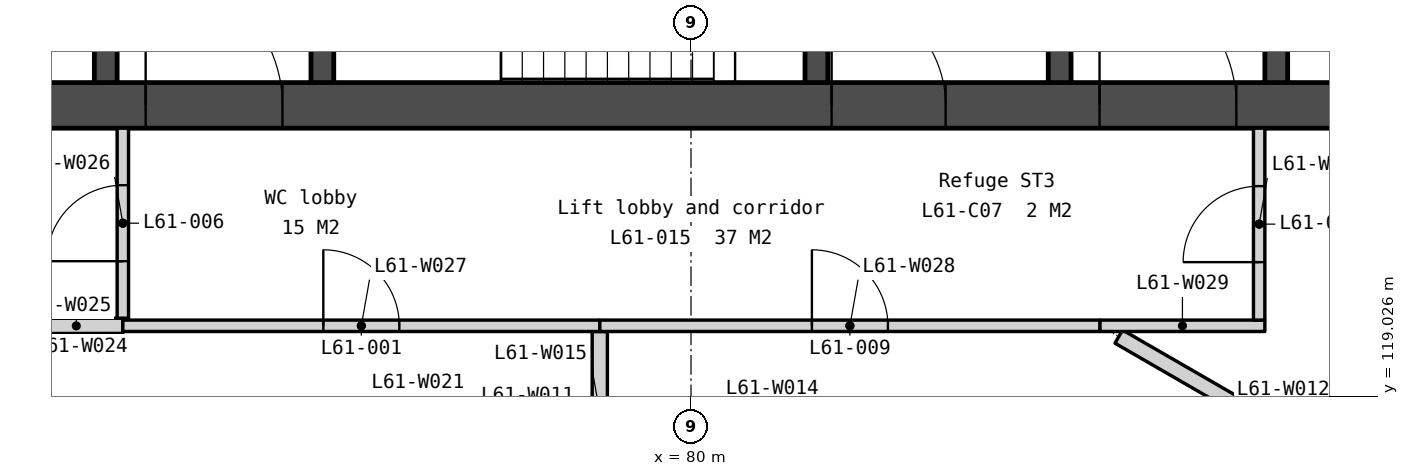
"""IFC4 building model, lengths in metres.
Left out: names, types, materials, properties, quantities, classifications, styles, units other than length and angle.
Written with IfcOpenShell. Run it as: python <this file> out.ifc"""

import sys

from ifc_helpers import new_model, si_unit, direction, frame, frame_2d, origin, place, context, subcontext, project, spatial, polyline, rectangle, outline, extrude, element, fill, save


model = new_model("IFC4")
c1 = context("Model", 3, precision=1e-05, world=origin(), true_north=direction((0.0, 1.0)))
c2 = subcontext(c1, "Body", "Model", "MODEL_VIEW")
j1 = project(units=[si_unit("LENGTHUNIT", "METRE"), si_unit("PLANEANGLEUNIT", "RADIAN")], contexts=[c1])
p1 = place(None, origin())
s1 = spatial("IfcSite", under=j1, at=p1, CompositionType="ELEMENT")
p2 = place(p1, origin())
s2 = spatial("IfcBuilding", under=s1, at=p2, CompositionType="ELEMENT")
p3 = place(p2, frame((0.0, 0.0, 250.4)))
s3 = spatial("IfcBuildingStorey", under=s2, at=p3, CompositionType="ELEMENT", Elevation=250.4)
p4 = place(p3, frame((69.0, 122.85, 0.0), z_axis=(0.0, 0.0, 1.0), x_axis=(1.0, 0.0, 0.0)))
e1 = element("IfcWall", 1, at=p4, inside=s3, PredefinedType="SOLIDWALL", context=c2, shape_type="SweptSolid", body=[
    extrude(rectangle(XDim=22.0, YDim=0.6, at=frame_2d((11.0, 0.0))), origin(), (0.0, 0.0, 1.0), 3.75),
])
p5 = place(p4, frame((16.375, 0.0, 0.0)))
e2 = element("IfcOpeningElement", 2, at=p5, cuts=e1, PredefinedType="OPENING", context=c2, shape_type="SweptSolid", body=[
    extrude(rectangle(XDim=1.8, YDim=2.1, at=frame_2d((0.9, 1.05))), frame((0.0, 0.31, 0.0), z_axis=(0.0, -1.0, 0.0), x_axis=(1.0, 0.0, 0.0)), (0.0, 0.0, 1.0), 0.62),
])
p6 = place(p4, frame((3.825, 0.0, 0.0)))
e3 = element("IfcOpeningElement", 3, at=p6, cuts=e1, PredefinedType="OPENING", context=c2, shape_type="SweptSolid", body=[
    extrude(rectangle(XDim=1.8, YDim=2.1, at=frame_2d((0.9, 1.05))), frame((0.0, 0.31, 0.0), z_axis=(0.0, -1.0, 0.0), x_axis=(1.0, 0.0, 0.0)), (0.0, 0.0, 1.0), 0.62),
])
p7 = place(p4, frame((12.85, 0.0, 0.0)))
e4 = element("IfcOpeningElement", 4, at=p7, cuts=e1, PredefinedType="OPENING", context=c2, shape_type="SweptSolid", body=[
    extrude(rectangle(XDim=1.5, YDim=2.1, at=frame_2d((0.75, 1.05))), frame((0.0, 0.31, 0.0), z_axis=(0.0, -1.0, 0.0), x_axis=(1.0, 0.0, 0.0)), (0.0, 0.0, 1.0), 0.62),
])
p8 = place(p3, frame((72.3, 133.95, 0.0), z_axis=(0.0, 0.0, 1.0), x_axis=(0.0, -1.0, 0.0)))
e5 = element("IfcWall", 5, at=p8, inside=s3, PredefinedType="SOLIDWALL", context=c2, shape_type="SweptSolid", body=[
    extrude(rectangle(XDim=10.8, YDim=0.3, at=frame_2d((5.4, 0.0))), origin(), (0.0, 0.0, 1.0), 3.75),
])
p9 = place(p8, frame((6.95, 0.0, 0.0)))
e6 = element("IfcOpeningElement", 6, at=p9, cuts=e5, PredefinedType="OPENING", context=c2, shape_type="SweptSolid", body=[
    extrude(rectangle(XDim=1.1, YDim=2.1, at=frame_2d((0.55, 1.05))), frame((0.0, 0.16, 0.0), z_axis=(0.0, -1.0, 0.0), x_axis=(1.0, 0.0, 0.0)), (0.0, 0.0, 1.0), 0.32),
])
p10 = place(p8, frame((9.35, 0.0, 0.0)))
e7 = element("IfcOpeningElement", 7, at=p10, cuts=e5, PredefinedType="OPENING", context=c2, shape_type="SweptSolid", body=[
    extrude(rectangle(XDim=0.9, YDim=2.1, at=frame_2d((0.45, 1.05))), frame((0.0, 0.16, 0.0), z_axis=(0.0, -1.0, 0.0), x_axis=(1.0, 0.0, 0.0)), (0.0, 0.0, 1.0), 0.32),
])
p11 = place(p8, frame((5.1, 0.0, 0.0)))
e8 = element("IfcOpeningElement", 8, at=p11, cuts=e5, PredefinedType="OPENING", context=c2, shape_type="SweptSolid", body=[
    extrude(rectangle(XDim=1.0, YDim=2.1, at=frame_2d((0.5, 1.05))), frame((0.0, 0.16, 0.0), z_axis=(0.0, -1.0, 0.0), x_axis=(1.0, 0.0, 0.0)), (0.0, 0.0, 1.0), 0.32),
])
p12 = place(p3, frame((75.15, 125.7, 0.0), z_axis=(0.0, 0.0, 1.0), x_axis=(0.0, -1.0, 0.0)))
e9 = element("IfcWall", 9, at=p12, inside=s3, PredefinedType="SOLIDWALL", context=c2, shape_type="SweptSolid", body=[
    extrude(rectangle(XDim=2.55, YDim=0.3, at=frame_2d((1.275, 0.0))), origin(), (0.0, 0.0, 1.0), 3.75),
])
p13 = place(p3, frame((81.65, 125.7, 0.0), z_axis=(0.0, 0.0, 1.0), x_axis=(0.0, -1.0, 0.0)))
e10 = element("IfcWall", 10, at=p13, inside=s3, PredefinedType="SOLIDWALL", context=c2, shape_type="SweptSolid", body=[
    extrude(rectangle(XDim=2.55, YDim=0.3, at=frame_2d((1.275, 0.0))), origin(), (0.0, 0.0, 1.0), 3.75),
])
p14 = place(p13, frame((0.75, 0.0, 0.0)))
e11 = element("IfcOpeningElement", 11, at=p14, cuts=e10, PredefinedType="OPENING", context=c2, shape_type="SweptSolid", body=[
    extrude(rectangle(XDim=1.0, YDim=2.1, at=frame_2d((0.5, 1.05))), frame((0.0, 0.16, 0.0), z_axis=(0.0, -1.0, 0.0), x_axis=(1.0, 0.0, 0.0)), (0.0, 0.0, 1.0), 0.32),
])
p15 = place(p3, frame((84.85, 125.85, 0.0), z_axis=(0.0, 0.0, 1.0), x_axis=(0.0, -1.0, 0.0)))
e12 = element("IfcWall", 12, at=p15, inside=s3, PredefinedType="SOLIDWALL", context=c2, shape_type="SweptSolid", body=[
    extrude(rectangle(XDim=2.7, YDim=0.3, at=frame_2d((1.35, 0.0))), origin(), (0.0, 0.0, 1.0), 3.75),
])
p16 = place(p3, frame((87.7, 133.95, 0.0), z_axis=(0.0, 0.0, 1.0), x_axis=(0.0, -1.0, 0.0)))
e13 = element("IfcWall", 13, at=p16, inside=s3, PredefinedType="SOLIDWALL", context=c2, shape_type="SweptSolid", body=[
    extrude(rectangle(XDim=10.8, YDim=0.3, at=frame_2d((5.4, 0.0))), origin(), (0.0, 0.0, 1.0), 3.75),
])
p17 = place(p16, frame((6.95, 0.0, 0.0)))
e14 = element("IfcOpeningElement", 14, at=p17, cuts=e13, PredefinedType="OPENING", context=c2, shape_type="SweptSolid", body=[
    extrude(rectangle(XDim=1.1, YDim=2.1, at=frame_2d((0.55, 1.05))), frame((0.0, 0.16, 0.0), z_axis=(0.0, -1.0, 0.0), x_axis=(1.0, 0.0, 0.0)), (0.0, 0.0, 1.0), 0.32),
])
p18 = place(p16, frame((5.1, 0.0, 0.0)))
e15 = element("IfcOpeningElement", 15, at=p18, cuts=e13, PredefinedType="OPENING", context=c2, shape_type="SweptSolid", body=[
    extrude(rectangle(XDim=1.0, YDim=2.1, at=frame_2d((0.5, 1.05))), frame((0.0, 0.16, 0.0), z_axis=(0.0, -1.0, 0.0), x_axis=(1.0, 0.0, 0.0)), (0.0, 0.0, 1.0), 0.32),
])
p19 = place(p16, frame((9.25, 0.0, 0.0)))
e16 = element("IfcOpeningElement", 16, at=p19, cuts=e13, PredefinedType="OPENING", context=c2, shape_type="SweptSolid", body=[
    extrude(rectangle(XDim=1.1, YDim=2.1, at=frame_2d((0.55, 1.05))), frame((0.0, 0.16, 0.0), z_axis=(0.0, -1.0, 0.0), x_axis=(1.0, 0.0, 0.0)), (0.0, 0.0, 1.0), 0.32),
])
p20 = place(p3, frame((60.609, 133.207, -0.15), z_axis=(0.0, 0.0, 1.0), x_axis=(0.500002536638, -0.866023939251, 0.0)))
e17 = element("IfcWall", 17, at=p20, inside=s3, PredefinedType="SOLIDWALL", context=c2, shape_type="SweptSolid", body=[
    extrude(outline(polyline([(36.972, 0.0), (36.972, 3.9), (0.0, 3.9), (0.0, 0.0), (36.972, 0.0)])), frame((0.0, 0.225, 0.0), z_axis=(0.0, -1.0, 0.0), x_axis=(1.0, 0.0, 0.0)), (0.0, 0.0, 1.0), 0.45),
])
p21 = place(p20, frame((3.172, 0.0, 0.95)))
e18 = element("IfcOpeningElement", 18, at=p21, cuts=e17, PredefinedType="OPENING", context=c2, shape_type="SweptSolid", body=[
    extrude(rectangle(XDim=1.2, YDim=2.2, at=frame_2d((0.6, 1.1))), frame((0.0, 0.235, 0.0), z_axis=(0.0, -1.0, 0.0), x_axis=(1.0, 0.0, 0.0)), (0.0, 0.0, 1.0), 0.47),
])
p22 = place(p20, frame((4.872, 0.0, 0.95)))
e19 = element("IfcOpeningElement", 19, at=p22, cuts=e17, PredefinedType="OPENING", context=c2, shape_type="SweptSolid", body=[
    extrude(rectangle(XDim=1.2, YDim=2.2, at=frame_2d((0.6, 1.1))), frame((0.0, 0.235, 0.0), z_axis=(0.0, -1.0, 0.0), x_axis=(1.0, 0.0, 0.0)), (0.0, 0.0, 1.0), 0.47),
])
p23 = place(p20, frame((12.415, 0.0, 0.95)))
e20 = element("IfcOpeningElement", 20, at=p23, cuts=e17, PredefinedType="OPENING", context=c2, shape_type="SweptSolid", body=[
    extrude(rectangle(XDim=1.2, YDim=2.2, at=frame_2d((0.6, 1.1))), frame((0.0, 0.235, 0.0), z_axis=(0.0, -1.0, 0.0), x_axis=(1.0, 0.0, 0.0)), (0.0, 0.0, 1.0), 0.47),
])
p24 = place(p20, frame((14.115, 0.0, 0.95)))
e21 = element("IfcOpeningElement", 21, at=p24, cuts=e17, PredefinedType="OPENING", context=c2, shape_type="SweptSolid", body=[
    extrude(rectangle(XDim=1.2, YDim=2.2, at=frame_2d((0.6, 1.1))), frame((0.0, 0.235, 0.0), z_axis=(0.0, -1.0, 0.0), x_axis=(1.0, 0.0, 0.0)), (0.0, 0.0, 1.0), 0.47),
])
p25 = place(p20, frame((21.658, 0.0, 0.95)))
e22 = element("IfcOpeningElement", 22, at=p25, cuts=e17, PredefinedType="OPENING", context=c2, shape_type="SweptSolid", body=[
    extrude(rectangle(XDim=1.2, YDim=2.2, at=frame_2d((0.6, 1.1))), frame((0.0, 0.235, 0.0), z_axis=(0.0, -1.0, 0.0), x_axis=(1.0, 0.0, 0.0)), (0.0, 0.0, 1.0), 0.47),
])
p26 = place(p20, frame((23.358, 0.0, 0.95)))
e23 = element("IfcOpeningElement", 23, at=p26, cuts=e17, PredefinedType="OPENING", context=c2, shape_type="SweptSolid", body=[
    extrude(rectangle(XDim=1.2, YDim=2.2, at=frame_2d((0.6, 1.1))), frame((0.0, 0.235, 0.0), z_axis=(0.0, -1.0, 0.0), x_axis=(1.0, 0.0, 0.0)), (0.0, 0.0, 1.0), 0.47),
])
p27 = place(p20, frame((30.901, 0.0, 0.95)))
e24 = element("IfcOpeningElement", 24, at=p27, cuts=e17, PredefinedType="OPENING", context=c2, shape_type="SweptSolid", body=[
    extrude(rectangle(XDim=1.2, YDim=2.2, at=frame_2d((0.6, 1.1))), frame((0.0, 0.235, 0.0), z_axis=(0.0, -1.0, 0.0), x_axis=(1.0, 0.0, 0.0)), (0.0, 0.0, 1.0), 0.47),
])
p28 = place(p20, frame((32.601, 0.0, 0.95)))
e25 = element("IfcOpeningElement", 25, at=p28, cuts=e17, PredefinedType="OPENING", context=c2, shape_type="SweptSolid", body=[
    extrude(rectangle(XDim=1.2, YDim=2.2, at=frame_2d((0.6, 1.1))), frame((0.0, 0.235, 0.0), z_axis=(0.0, -1.0, 0.0), x_axis=(1.0, 0.0, 0.0)), (0.0, 0.0, 1.0), 0.47),
])
p29 = place(p3, frame((80.905, 101.188, -0.15), z_axis=(0.0, 0.0, 1.0), x_axis=(0.500002536638, 0.866023939251, 0.0)))
e26 = element("IfcWall", 26, at=p29, inside=s3, PredefinedType="SOLIDWALL", context=c2, shape_type="SweptSolid", body=[
    extrude(outline(polyline([(36.972, 0.0), (36.972, 3.9), (0.0, 3.9), (0.0, 0.0), (36.972, 0.0)])), frame((0.0, 0.225, 0.0), z_axis=(0.0, -1.0, 0.0), x_axis=(1.0, 0.0, 0.0)), (0.0, 0.0, 1.0), 0.45),
])
p30 = place(p29, frame((3.172, 0.0, 0.95)))
e27 = element("IfcOpeningElement", 27, at=p30, cuts=e26, PredefinedType="OPENING", context=c2, shape_type="SweptSolid", body=[
    extrude(rectangle(XDim=1.2, YDim=2.2, at=frame_2d((0.6, 1.1))), frame((0.0, 0.235, 0.0), z_axis=(0.0, -1.0, 0.0), x_axis=(1.0, 0.0, 0.0)), (0.0, 0.0, 1.0), 0.47),
])
p31 = place(p29, frame((4.872, 0.0, 0.95)))
e28 = element("IfcOpeningElement", 28, at=p31, cuts=e26, PredefinedType="OPENING", context=c2, shape_type="SweptSolid", body=[
    extrude(rectangle(XDim=1.2, YDim=2.2, at=frame_2d((0.6, 1.1))), frame((0.0, 0.235, 0.0), z_axis=(0.0, -1.0, 0.0), x_axis=(1.0, 0.0, 0.0)), (0.0, 0.0, 1.0), 0.47),
])
p32 = place(p29, frame((12.415, 0.0, 0.95)))
e29 = element("IfcOpeningElement", 29, at=p32, cuts=e26, PredefinedType="OPENING", context=c2, shape_type="SweptSolid", body=[
    extrude(rectangle(XDim=1.2, YDim=2.2, at=frame_2d((0.6, 1.1))), frame((0.0, 0.235, 0.0), z_axis=(0.0, -1.0, 0.0), x_axis=(1.0, 0.0, 0.0)), (0.0, 0.0, 1.0), 0.47),
])
p33 = place(p29, frame((14.115, 0.0, 0.95)))
e30 = element("IfcOpeningElement", 30, at=p33, cuts=e26, PredefinedType="OPENING", context=c2, shape_type="SweptSolid", body=[
    extrude(rectangle(XDim=1.2, YDim=2.2, at=frame_2d((0.6, 1.1))), frame((0.0, 0.235, 0.0), z_axis=(0.0, -1.0, 0.0), x_axis=(1.0, 0.0, 0.0)), (0.0, 0.0, 1.0), 0.47),
])
p34 = place(p29, frame((21.658, 0.0, 0.95)))
e31 = element("IfcOpeningElement", 31, at=p34, cuts=e26, PredefinedType="OPENING", context=c2, shape_type="SweptSolid", body=[
    extrude(rectangle(XDim=1.2, YDim=2.2, at=frame_2d((0.6, 1.1))), frame((0.0, 0.235, 0.0), z_axis=(0.0, -1.0, 0.0), x_axis=(1.0, 0.0, 0.0)), (0.0, 0.0, 1.0), 0.47),
])
p35 = place(p29, frame((23.358, 0.0, 0.95)))
e32 = element("IfcOpeningElement", 32, at=p35, cuts=e26, PredefinedType="OPENING", context=c2, shape_type="SweptSolid", body=[
    extrude(rectangle(XDim=1.2, YDim=2.2, at=frame_2d((0.6, 1.1))), frame((0.0, 0.235, 0.0), z_axis=(0.0, -1.0, 0.0), x_axis=(1.0, 0.0, 0.0)), (0.0, 0.0, 1.0), 0.47),
])
p36 = place(p29, frame((30.901, 0.0, 0.95)))
e33 = element("IfcOpeningElement", 33, at=p36, cuts=e26, PredefinedType="OPENING", context=c2, shape_type="SweptSolid", body=[
    extrude(rectangle(XDim=1.2, YDim=2.2, at=frame_2d((0.6, 1.1))), frame((0.0, 0.235, 0.0), z_axis=(0.0, -1.0, 0.0), x_axis=(1.0, 0.0, 0.0)), (0.0, 0.0, 1.0), 0.47),
])
p37 = place(p29, frame((32.601, 0.0, 0.95)))
e34 = element("IfcOpeningElement", 34, at=p37, cuts=e26, PredefinedType="OPENING", context=c2, shape_type="SweptSolid", body=[
    extrude(rectangle(XDim=1.2, YDim=2.2, at=frame_2d((0.6, 1.1))), frame((0.0, 0.235, 0.0), z_axis=(0.0, -1.0, 0.0), x_axis=(1.0, 0.0, 0.0)), (0.0, 0.0, 1.0), 0.47),
])
p38 = place(p3, frame((85.628, 119.807, 0.0), z_axis=(0.0, 0.0, 1.0), x_axis=(0.866032544947, -0.499987630939, 0.0)))
e35 = element("IfcWall", 35, at=p38, inside=s3, PredefinedType="PARTITIONING", context=c2, shape_type="SweptSolid", body=[
    extrude(rectangle(XDim=4.994, YDim=0.2, at=frame_2d((2.497, 0.0))), origin(), (0.0, 0.0, 1.0), 3.75),
])
p39 = place(p3, frame((78.8, 117.74, 0.0), z_axis=(0.0, 0.0, 1.0), x_axis=(0.0, 1.0, 0.0)))
e36 = element("IfcWall", 36, at=p39, inside=s3, PredefinedType="PARTITIONING", context=c2, shape_type="SweptSolid", body=[
    extrude(rectangle(XDim=2.135, YDim=0.2, at=frame_2d((1.067, 0.0))), origin(), (0.0, 0.0, 1.0), 3.75),
])
p40 = place(p3, frame((71.3, 119.948, 0.0), z_axis=(0.0, 0.0, 1.0), x_axis=(0.999998728662, 0.001594576406, 0.0)))
e37 = element("IfcWall", 37, at=p40, inside=s3, PredefinedType="PARTITIONING", context=c2, shape_type="SweptSolid", body=[
    extrude(rectangle(XDim=1.225, YDim=0.2, at=frame_2d((0.612, 0.0))), origin(), (0.0, 0.0, 1.0), 3.75),
])
p41 = place(p3, frame((72.525, 120.05, 0.0), z_axis=(0.0, 0.0, 1.0), x_axis=(0.0, 1.0, 0.0)))
e38 = element("IfcWall", 38, at=p41, inside=s3, PredefinedType="PARTITIONING", context=c2, shape_type="SweptSolid", body=[
    extrude(rectangle(XDim=2.5, YDim=0.15, at=frame_2d((1.25, 0.0))), origin(), (0.0, 0.0, 1.0), 3.75),
])
p42 = place(p41, frame((0.75, 0.0, 0.0)))
e39 = element("IfcOpeningElement", 39, at=p42, cuts=e38, PredefinedType="OPENING", context=c2, shape_type="SweptSolid", body=[
    extrude(rectangle(XDim=1.0, YDim=2.1, at=frame_2d((0.5, 1.05))), frame((0.0, 0.085, 0.0), z_axis=(0.0, -1.0, 0.0), x_axis=(1.0, 0.0, 0.0)), (0.0, 0.0, 1.0), 0.17),
])
p43 = place(p3, frame((72.525, 119.95, 0.0), z_axis=(0.0, 0.0, 1.0), x_axis=(1.0, 0.0, 0.0)))
e40 = element("IfcWall", 40, at=p43, inside=s3, PredefinedType="PARTITIONING", context=c2, shape_type="SweptSolid", body=[
    extrude(rectangle(XDim=6.275, YDim=0.15, at=frame_2d((3.138, 0.0))), origin(), (0.0, 0.0, 1.0), 3.75),
])
p44 = place(p43, frame((2.637, 0.0, 0.0)))
e41 = element("IfcOpeningElement", 41, at=p44, cuts=e40, PredefinedType="OPENING", context=c2, shape_type="SweptSolid", body=[
    extrude(rectangle(XDim=1.0, YDim=2.1, at=frame_2d((0.5, 1.05))), frame((0.0, 0.085, 0.0), z_axis=(0.0, -1.0, 0.0), x_axis=(1.0, 0.0, 0.0)), (0.0, 0.0, 1.0), 0.17),
])
p45 = place(p3, frame((78.8, 119.95, 0.0), z_axis=(0.0, 0.0, 1.0), x_axis=(1.0, 0.0, 0.0)))
e42 = element("IfcWall", 42, at=p45, inside=s3, PredefinedType="PARTITIONING", context=c2, shape_type="SweptSolid", body=[
    extrude(rectangle(XDim=6.581, YDim=0.15, at=frame_2d((3.291, 0.0))), origin(), (0.0, 0.0, 1.0), 3.75),
])
p46 = place(p45, frame((2.791, 0.0, 0.0)))
e43 = element("IfcOpeningElement", 43, at=p46, cuts=e42, PredefinedType="OPENING", context=c2, shape_type="SweptSolid", body=[
    extrude(rectangle(XDim=1.0, YDim=2.1, at=frame_2d((0.5, 1.05))), frame((0.0, 0.085, 0.0), z_axis=(0.0, -1.0, 0.0), x_axis=(1.0, 0.0, 0.0)), (0.0, 0.0, 1.0), 0.17),
])
p47 = place(p3, frame((85.381, 119.95, 0.0), z_axis=(0.0, 0.0, 1.0), x_axis=(1.0, 0.0, 0.0)))
e44 = element("IfcWall", 44, at=p47, inside=s3, PredefinedType="PARTITIONING", context=c2, shape_type="SweptSolid", body=[
    extrude(rectangle(XDim=2.169, YDim=0.15, at=frame_2d((1.084, 0.0))), origin(), (0.0, 0.0, 1.0), 3.75),
])
p48 = place(p3, frame((87.475, 120.025, 0.0), z_axis=(0.0, 0.0, 1.0), x_axis=(0.0, 1.0, 0.0)))
e45 = element("IfcWall", 45, at=p48, inside=s3, PredefinedType="PARTITIONING", context=c2, shape_type="SweptSolid", body=[
    extrude(rectangle(XDim=2.525, YDim=0.15, at=frame_2d((1.263, 0.0))), origin(), (0.0, 0.0, 1.0), 3.75),
])
p49 = place(p48, frame((0.762, 0.0, 0.0)))
e46 = element("IfcOpeningElement", 46, at=p49, cuts=e45, PredefinedType="OPENING", context=c2, shape_type="SweptSolid", body=[
    extrude(rectangle(XDim=1.0, YDim=2.1, at=frame_2d((0.5, 1.05))), frame((0.0, 0.085, 0.0), z_axis=(0.0, -1.0, 0.0), x_axis=(1.0, 0.0, 0.0)), (0.0, 0.0, 1.0), 0.17),
])
p50 = place(p5, origin())
e47 = element("IfcDoor", 47, at=p50, inside=s3, OperationType="DOUBLE_DOOR_DOUBLE_SWING", PredefinedType="DOOR", context=c2, shape_type="SweptSolid", body=[
    extrude(rectangle(XDim=1.8, YDim=2.1, at=frame_2d((0.9, 1.05))), frame((0.0, 0.025, 0.0), z_axis=(0.0, -1.0, 0.0), x_axis=(1.0, 0.0, 0.0)), (0.0, 0.0, 1.0), 0.05),
])
fill(e2, e47)
p51 = place(p6, origin())
e48 = element("IfcDoor", 48, at=p51, inside=s3, OperationType="DOUBLE_DOOR_DOUBLE_SWING", PredefinedType="DOOR", context=c2, shape_type="SweptSolid", body=[
    extrude(rectangle(XDim=1.8, YDim=2.1, at=frame_2d((0.9, 1.05))), frame((0.0, 0.025, 0.0), z_axis=(0.0, -1.0, 0.0), x_axis=(1.0, 0.0, 0.0)), (0.0, 0.0, 1.0), 0.05),
])
fill(e3, e48)
p52 = place(p7, origin())
e49 = element("IfcDoor", 49, at=p52, inside=s3, OperationType="DOUBLE_DOOR_DOUBLE_SWING", PredefinedType="DOOR", context=c2, shape_type="SweptSolid", body=[
    extrude(rectangle(XDim=1.5, YDim=2.1, at=frame_2d((0.75, 1.05))), frame((0.0, 0.025, 0.0), z_axis=(0.0, -1.0, 0.0), x_axis=(1.0, 0.0, 0.0)), (0.0, 0.0, 1.0), 0.05),
])
fill(e4, e49)
p53 = place(p44, origin())
e50 = element("IfcDoor", 50, at=p53, inside=s3, OperationType="SINGLE_SWING_LEFT", PredefinedType="DOOR", context=c2, shape_type="SweptSolid", body=[
    extrude(rectangle(XDim=1.0, YDim=2.1, at=frame_2d((0.5, 1.05))), frame((0.0, 0.025, 0.0), z_axis=(0.0, -1.0, 0.0), x_axis=(1.0, 0.0, 0.0)), (0.0, 0.0, 1.0), 0.05),
])
fill(e41, e50)
p54 = place(p42, origin())
e51 = element("IfcDoor", 51, at=p54, inside=s3, OperationType="SINGLE_SWING_LEFT", PredefinedType="DOOR", context=c2, shape_type="SweptSolid", body=[
    extrude(rectangle(XDim=1.0, YDim=2.1, at=frame_2d((0.5, 1.05))), frame((0.0, 0.025, 0.0), z_axis=(0.0, -1.0, 0.0), x_axis=(1.0, 0.0, 0.0)), (0.0, 0.0, 1.0), 0.05),
])
fill(e39, e51)
p55 = place(p46, origin())
e52 = element("IfcDoor", 52, at=p55, inside=s3, OperationType="SINGLE_SWING_LEFT", PredefinedType="DOOR", context=c2, shape_type="SweptSolid", body=[
    extrude(rectangle(XDim=1.0, YDim=2.1, at=frame_2d((0.5, 1.05))), frame((0.0, 0.025, 0.0), z_axis=(0.0, -1.0, 0.0), x_axis=(1.0, 0.0, 0.0)), (0.0, 0.0, 1.0), 0.05),
])
fill(e43, e52)
p56 = place(p49, origin())
e53 = element("IfcDoor", 53, at=p56, inside=s3, OperationType="SINGLE_SWING_LEFT", PredefinedType="DOOR", context=c2, shape_type="SweptSolid", body=[
    extrude(rectangle(XDim=1.0, YDim=2.1, at=frame_2d((0.5, 1.05))), frame((0.0, 0.025, 0.0), z_axis=(0.0, -1.0, 0.0), x_axis=(1.0, 0.0, 0.0)), (0.0, 0.0, 1.0), 0.05),
])
fill(e46, e53)
save(model, sys.argv[1])
